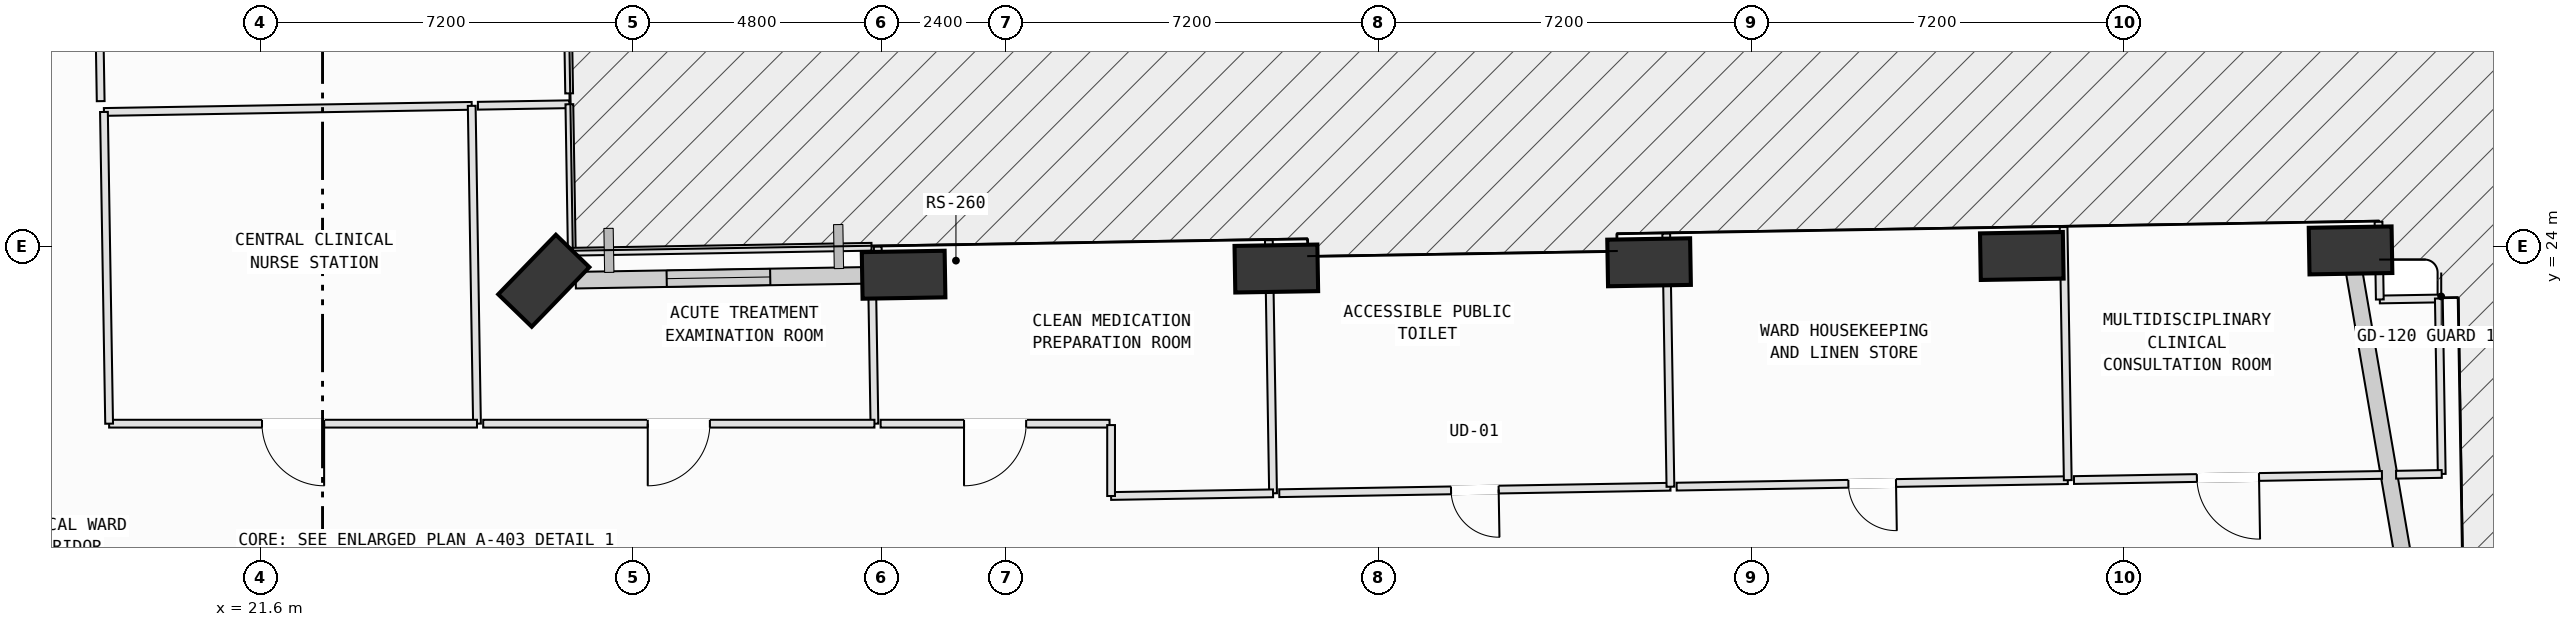
"""IFC4 building model, lengths in metres.
Left out: names, types, materials, properties, quantities, classifications, styles, units other than length and angle.
Written with IfcOpenShell. Run it as: python <this file> out.ifc"""

import sys

from ifc_helpers import new_model, si_unit, direction, frame, frame_2d, origin, origin_2d, place, context, subcontext, project, spatial, rectangle, extrude, element, fill, save


model = new_model("IFC4")
c1 = context("Model", 3, precision=1e-05, world=origin(), true_north=direction((0.0, 1.0)))
c2 = subcontext(c1, "Body", "Model", "MODEL_VIEW")
j1 = project(units=[si_unit("LENGTHUNIT", "METRE"), si_unit("PLANEANGLEUNIT", "RADIAN")], contexts=[c1])
p1 = place(None, origin())
s1 = spatial("IfcSite", under=j1, at=p1, CompositionType="ELEMENT")
p2 = place(p1, origin())
s2 = spatial("IfcBuilding", under=s1, at=p2, CompositionType="ELEMENT")
p3 = place(p2, frame((0.0, 0.0, 27.0)))
s3 = spatial("IfcBuildingStorey", under=s2, at=p3, CompositionType="ELEMENT", Elevation=27.0)
p4 = place(p3, frame((61.969, 23.927, 0.057), z_axis=(0.002645138418, 0.116755179478, 0.993157203724), x_axis=(-0.999979002339, 0.006184310224, 0.001936282211)))
e1 = element("IfcColumn", 1, at=p4, inside=s3, PredefinedType="COLUMN", context=c2, shape_type="SweptSolid", body=[
    extrude(rectangle(XDim=1.6, YDim=0.9, at=origin_2d()), origin(), (0.0, 0.0, 1.0), 3.969),
])
p5 = place(p3, frame((55.62, 23.819, 0.045), z_axis=(0.003259253209, 0.090890117801, 0.995855593826), x_axis=(-0.999812006262, 0.019330761155, 0.001507914743)))
e2 = element("IfcColumn", 2, at=p5, inside=s3, PredefinedType="COLUMN", context=c2, shape_type="SweptSolid", body=[
    extrude(rectangle(XDim=1.6, YDim=0.9, at=origin_2d()), origin(), (0.0, 0.0, 1.0), 3.97),
])
p6 = place(p3, frame((48.42, 23.698, 0.031), z_axis=(0.004053851725, 0.061360573833, 0.998107432226), x_axis=(-0.998778514599, 0.049400802185, 0.001019568036)))
e3 = element("IfcColumn", 3, at=p6, inside=s3, PredefinedType="COLUMN", context=c2, shape_type="SweptSolid", body=[
    extrude(rectangle(XDim=1.6, YDim=0.9, at=origin_2d()), origin(), (0.0, 0.0, 1.0), 3.975),
])
p7 = place(p3, frame((41.221, 23.577, 0.017), z_axis=(0.004781067333, 0.031628599282, 0.99948825561), x_axis=(-0.991107976076, 0.133059003759, 0.000530355464)))
e4 = element("IfcColumn", 4, at=p7, inside=s3, PredefinedType="COLUMN", context=c2, shape_type="SweptSolid", body=[
    extrude(rectangle(XDim=1.6, YDim=0.9, at=origin_2d()), origin(), (0.0, 0.0, 1.0), 3.983),
])
p8 = place(p3, frame((34.022, 23.457, 0.005), z_axis=(0.005502475307, 0.001834158436, 0.999983179173), x_axis=(-0.331913078241, 0.943309969864, 9.6165196e-05)))
e5 = element("IfcColumn", 5, at=p8, inside=s3, PredefinedType="COLUMN", context=c2, shape_type="SweptSolid", body=[
    extrude(rectangle(XDim=1.6, YDim=0.9, at=origin_2d()), origin(), (0.0, 0.0, 1.0), 3.993),
])
p9 = place(p3, frame((27.073, 23.341, 0.027), z_axis=(0.006268343102, -0.026978457077, 0.999616361775), x_axis=(0.514645990201, 0.857171641493, 0.019906827715)))
e6 = element("IfcColumn", 6, at=p9, inside=s3, PredefinedType="COLUMN", context=c2, shape_type="SweptSolid", body=[
    extrude(rectangle(XDim=1.6, YDim=0.9, at=origin_2d()), origin(), (0.0, 0.0, 1.0), 3.973),
])
p10 = place(p3, frame((62.032, 23.55, 0.0), z_axis=(0.0, 0.0, 1.0), x_axis=(0.169181724712, -0.985584874084, 0.0)))
e7 = element("IfcWall", 7, at=p10, inside=s3, PredefinedType="SOLIDWALL", context=c2, shape_type="SweptSolid", body=[
    extrude(rectangle(XDim=8.614, YDim=0.32, at=frame_2d((4.307, 0.0))), origin(), (0.0, 0.0, 1.0), 3.165),
])
p11 = place(p3, frame((27.69, 23.352, 0.0), z_axis=(0.0, 0.0, 1.0), x_axis=(0.999862237026, 0.016598402607, 0.0)))
e8 = element("IfcWall", 8, at=p11, inside=s3, PredefinedType="SOLIDWALL", context=c2, shape_type="SweptSolid", body=[
    extrude(rectangle(XDim=5.736, YDim=0.32, at=frame_2d((2.868, 0.0))), origin(), (0.0, 0.0, 1.0), 3.165),
])
p12 = place(p11, frame((1.757, 0.0, 0.75)))
e9 = element("IfcOpeningElement", 9, at=p12, cuts=e8, PredefinedType="OPENING", context=c2, shape_type="SweptSolid", body=[
    extrude(rectangle(XDim=2.0, YDim=1.95, at=frame_2d((1.0, 0.975))), frame((0.0, 0.17, 0.0), z_axis=(0.0, -1.0, 0.0), x_axis=(1.0, 0.0, 0.0)), (0.0, 0.0, 1.0), 0.34),
])
p13 = place(p3, frame((18.578, 26.601, 0.0), z_axis=(0.0, 0.0, 1.0), x_axis=(0.999862225883, 0.016599073868, 0.0)))
e10 = element("IfcWall", 10, at=p13, inside=s3, PredefinedType="PARTITIONING", context=c2, shape_type="SweptSolid", body=[
    extrude(rectangle(XDim=7.104, YDim=0.15, at=frame_2d((3.552, 0.0))), origin(), (0.0, 0.0, 1.0), 3.78),
])
p14 = place(p3, frame((25.681, 26.719, 0.0), z_axis=(0.0, 0.0, 1.0), x_axis=(0.016621286784, -0.999861856871, 0.0)))
e11 = element("IfcWall", 11, at=p14, inside=s3, PredefinedType="PARTITIONING", context=c2, shape_type="SweptSolid", body=[
    extrude(rectangle(XDim=6.14, YDim=0.15, at=frame_2d((3.07, 0.0))), origin(), (0.0, 0.0, 1.0), 1.365),
])
p15 = place(p3, frame((25.783, 20.58, 0.0), z_axis=(0.0, 0.0, 1.0), x_axis=(-1.0, 0.0, 0.0)))
e12 = element("IfcWall", 12, at=p15, inside=s3, PredefinedType="PARTITIONING", context=c2, shape_type="SweptSolid", body=[
    extrude(rectangle(XDim=7.105, YDim=0.15, at=frame_2d((3.552, 0.0))), origin(), (0.0, 0.0, 1.0), 3.78),
])
p16 = place(p15, frame((2.952, 0.0, 0.0)))
e13 = element("IfcOpeningElement", 13, at=p16, cuts=e12, PredefinedType="OPENING", context=c2, shape_type="SweptSolid", body=[
    extrude(rectangle(XDim=1.2, YDim=2.15, at=frame_2d((0.6, 1.075))), frame((0.0, 0.085, 0.0), z_axis=(0.0, -1.0, 0.0), x_axis=(1.0, 0.0, 0.0)), (0.0, 0.0, 1.0), 0.17),
])
p17 = place(p3, frame((18.678, 20.58, 0.0), z_axis=(0.0, 0.0, 1.0), x_axis=(-0.016622469923, 0.999861837202, 0.0)))
e14 = element("IfcWall", 14, at=p17, inside=s3, PredefinedType="PARTITIONING", context=c2, shape_type="SweptSolid", body=[
    extrude(rectangle(XDim=6.022, YDim=0.15, at=frame_2d((3.011, 0.0))), origin(), (0.0, 0.0, 1.0), 3.78),
])
p18 = place(p3, frame((25.801, 26.721, 0.0), z_axis=(0.0, 0.0, 1.0), x_axis=(0.999864687212, 0.016450144861, 0.0)))
e15 = element("IfcWall", 15, at=p18, inside=s3, PredefinedType="PARTITIONING", context=c2, shape_type="SweptSolid", body=[
    extrude(rectangle(XDim=1.766, YDim=0.15, at=frame_2d((0.883, 0.0))), origin(), (0.0, 0.0, 1.0), 3.78),
])
p19 = place(p3, frame((27.567, 26.75, 0.0), z_axis=(0.0, 0.0, 1.0), x_axis=(0.016535870755, -0.999863273142, 0.0)))
e16 = element("IfcWall", 16, at=p19, inside=s3, PredefinedType="PARTITIONING", context=c2, shape_type="SweptSolid", body=[
    extrude(rectangle(XDim=2.85, YDim=0.15, at=frame_2d((1.425, 0.0))), origin(), (0.0, 0.0, 1.0), 3.78),
])
p20 = place(p3, frame((27.614, 23.901, 0.0), z_axis=(0.0, 0.0, 1.0), x_axis=(0.999861981864, 0.016613766062, 0.0)))
e17 = element("IfcWall", 17, at=p20, inside=s3, PredefinedType="PARTITIONING", context=c2, shape_type="SweptSolid", body=[
    extrude(rectangle(XDim=5.79, YDim=0.15, at=frame_2d((2.895, 0.0))), origin(), (0.0, 0.0, 1.0), 3.78),
])
p21 = place(p3, frame((33.414, 23.312, 0.0), z_axis=(0.0, 0.0, 1.0), x_axis=(0.016441030387, -0.999864837125, 0.0)))
e18 = element("IfcWall", 18, at=p21, inside=s3, PredefinedType="PARTITIONING", context=c2, shape_type="SweptSolid", body=[
    extrude(rectangle(XDim=2.732, YDim=0.15, at=frame_2d((1.366, 0.0))), origin(), (0.0, 0.0, 1.0), 3.78),
])
p22 = place(p3, frame((33.459, 20.58, 0.0), z_axis=(0.0, 0.0, 1.0), x_axis=(-1.0, 0.0, 0.0)))
e19 = element("IfcWall", 19, at=p22, inside=s3, PredefinedType="PARTITIONING", context=c2, shape_type="SweptSolid", body=[
    extrude(rectangle(XDim=7.556, YDim=0.15, at=frame_2d((3.778, 0.0))), origin(), (0.0, 0.0, 1.0), 3.78),
])
p23 = place(p22, frame((3.178, 0.0, 0.0)))
e20 = element("IfcOpeningElement", 20, at=p23, cuts=e19, PredefinedType="OPENING", context=c2, shape_type="SweptSolid", body=[
    extrude(rectangle(XDim=1.2, YDim=2.15, at=frame_2d((0.6, 1.075))), frame((0.0, 0.085, 0.0), z_axis=(0.0, -1.0, 0.0), x_axis=(1.0, 0.0, 0.0)), (0.0, 0.0, 1.0), 0.17),
])
p24 = place(p3, frame((38.0, 20.58, 0.0), z_axis=(0.0, 0.0, 1.0), x_axis=(-1.0, 0.0, 0.0)))
e21 = element("IfcWall", 21, at=p24, inside=s3, PredefinedType="PARTITIONING", context=c2, shape_type="SweptSolid", body=[
    extrude(rectangle(XDim=4.421, YDim=0.15, at=frame_2d((2.21, 0.0))), origin(), (0.0, 0.0, 1.0), 3.365),
])
p25 = place(p24, frame((1.611, 0.0, 0.0)))
e22 = element("IfcOpeningElement", 22, at=p25, cuts=e21, PredefinedType="OPENING", context=c2, shape_type="SweptSolid", body=[
    extrude(rectangle(XDim=1.2, YDim=2.15, at=frame_2d((0.6, 1.075))), frame((0.0, 0.085, 0.0), z_axis=(0.0, -1.0, 0.0), x_axis=(1.0, 0.0, 0.0)), (0.0, 0.0, 1.0), 0.17),
])
p26 = place(p3, frame((33.531, 23.532, 0.0), z_axis=(0.0, 0.0, 1.0), x_axis=(-0.017247825975, 0.999851245186, 0.0)))
e23 = element("IfcWall", 23, at=p26, inside=s3, PredefinedType="PARTITIONING", context=c2, shape_type="SweptSolid", body=[
    extrude(rectangle(XDim=0.467, YDim=0.15, at=frame_2d((0.233, 0.0))), origin(), (0.0, 0.0, 1.0), 3.78),
])
p27 = place(p3, frame((41.077, 24.124, 0.0), z_axis=(0.0, 0.0, 1.0), x_axis=(0.016576997782, -0.999862592132, 0.0)))
e24 = element("IfcWall", 24, at=p27, inside=s3, PredefinedType="PARTITIONING", context=c2, shape_type="SweptSolid", body=[
    extrude(rectangle(XDim=4.89, YDim=0.15, at=frame_2d((2.445, 0.0))), origin(), (0.0, 0.0, 1.0), 3.78),
])
p28 = place(p3, frame((41.158, 19.235, 0.0), z_axis=(0.0, 0.0, 1.0), x_axis=(-0.999861832679, -0.016622741989, 0.0)))
e25 = element("IfcWall", 25, at=p28, inside=s3, PredefinedType="PARTITIONING", context=c2, shape_type="SweptSolid", body=[
    extrude(rectangle(XDim=3.128, YDim=0.15, at=frame_2d((1.564, 0.0))), origin(), (0.0, 0.0, 1.0), 3.78),
])
p29 = place(p3, frame((38.03, 19.183, 0.0), z_axis=(0.0, 0.0, 1.0), x_axis=(0.0, 1.0, 0.0)))
e26 = element("IfcWall", 26, at=p29, inside=s3, PredefinedType="PARTITIONING", context=c2, shape_type="SweptSolid", body=[
    extrude(rectangle(XDim=1.37, YDim=0.15, at=frame_2d((0.685, 0.0))), origin(), (0.0, 0.0, 1.0), 3.78),
])
p30 = place(p3, frame((48.833, 19.362, 0.0), z_axis=(0.0, 0.0, 1.0), x_axis=(-0.999863151577, -0.0165432197, 0.0)))
e27 = element("IfcWall", 27, at=p30, inside=s3, PredefinedType="PARTITIONING", context=c2, shape_type="SweptSolid", body=[
    extrude(rectangle(XDim=7.556, YDim=0.15, at=frame_2d((3.778, 0.0))), origin(), (0.0, 0.0, 1.0), 2.765),
])
p31 = place(p30, frame((3.318, 0.0, 0.0)))
e28 = element("IfcOpeningElement", 28, at=p31, cuts=e27, PredefinedType="OPENING", context=c2, shape_type="SweptSolid", body=[
    extrude(rectangle(XDim=0.92, YDim=2.1, at=frame_2d((0.46, 1.05))), frame((0.0, 0.085, 0.0), z_axis=(0.0, -1.0, 0.0), x_axis=(1.0, 0.0, 0.0)), (0.0, 0.0, 1.0), 0.17),
])
p32 = place(p3, frame((48.752, 24.251, 0.0), z_axis=(0.0, 0.0, 1.0), x_axis=(0.016576997782, -0.999862592132, 0.0)))
e29 = element("IfcWall", 29, at=p32, inside=s3, PredefinedType="PARTITIONING", context=c2, shape_type="SweptSolid", body=[
    extrude(rectangle(XDim=4.89, YDim=0.15, at=frame_2d((2.445, 0.0))), origin(), (0.0, 0.0, 1.0), 3.365),
])
p33 = place(p3, frame((56.507, 19.489, 0.0), z_axis=(0.0, 0.0, 1.0), x_axis=(-0.999863125045, -0.016544823218, 0.0)))
e30 = element("IfcWall", 30, at=p33, inside=s3, PredefinedType="PARTITIONING", context=c2, shape_type="SweptSolid", body=[
    extrude(rectangle(XDim=7.555, YDim=0.15, at=frame_2d((3.778, 0.0))), origin(), (0.0, 0.0, 1.0), 3.78),
])
p34 = place(p33, frame((3.317, 0.0, 0.0)))
e31 = element("IfcOpeningElement", 31, at=p34, cuts=e30, PredefinedType="OPENING", context=c2, shape_type="SweptSolid", body=[
    extrude(rectangle(XDim=0.92, YDim=2.1, at=frame_2d((0.46, 1.05))), frame((0.0, 0.085, 0.0), z_axis=(0.0, -1.0, 0.0), x_axis=(1.0, 0.0, 0.0)), (0.0, 0.0, 1.0), 0.17),
])
p35 = place(p3, frame((56.426, 24.378, 0.0), z_axis=(0.0, 0.0, 1.0), x_axis=(0.016576997782, -0.999862592132, 0.0)))
e32 = element("IfcWall", 32, at=p35, inside=s3, PredefinedType="PARTITIONING", context=c2, shape_type="SweptSolid", body=[
    extrude(rectangle(XDim=4.89, YDim=0.15, at=frame_2d((2.445, 0.0))), origin(), (0.0, 0.0, 1.0), 3.78),
])
p36 = place(p3, frame((62.534, 22.979, 0.0), z_axis=(0.0, 0.0, 1.0), x_axis=(0.999860544838, 0.016700026231, 0.0)))
e33 = element("IfcWall", 33, at=p36, inside=s3, PredefinedType="PARTITIONING", context=c2, shape_type="SweptSolid", body=[
    extrude(rectangle(XDim=1.14, YDim=0.15, at=frame_2d((0.57, 0.0))), origin(), (0.0, 0.0, 1.0), 3.78),
])
p37 = place(p3, frame((63.674, 22.998, 0.0), z_axis=(0.0, 0.0, 1.0), x_axis=(0.016493938061, -0.999863965751, 0.0)))
e34 = element("IfcWall", 34, at=p37, inside=s3, PredefinedType="PARTITIONING", context=c2, shape_type="SweptSolid", body=[
    extrude(rectangle(XDim=3.39, YDim=0.15, at=frame_2d((1.695, 0.0))), origin(), (0.0, 0.0, 1.0), 3.78),
])
p38 = place(p3, frame((63.73, 19.609, 0.0), z_axis=(0.0, 0.0, 1.0), x_axis=(-0.999857504577, -0.016881070517, 0.0)))
e35 = element("IfcWall", 35, at=p38, inside=s3, PredefinedType="PARTITIONING", context=c2, shape_type="SweptSolid", body=[
    extrude(rectangle(XDim=0.882, YDim=0.15, at=frame_2d((0.441, 0.0))), origin(), (0.0, 0.0, 1.0), 3.78),
])
p39 = place(p3, frame((62.575, 19.59, 0.0), z_axis=(0.0, 0.0, 1.0), x_axis=(-0.999861174228, -0.016662300896, 0.0)))
e36 = element("IfcWall", 36, at=p39, inside=s3, PredefinedType="PARTITIONING", context=c2, shape_type="SweptSolid", body=[
    extrude(rectangle(XDim=5.949, YDim=0.15, at=frame_2d((2.974, 0.0))), origin(), (0.0, 0.0, 1.0), 3.78),
])
p40 = place(p39, frame((2.375, 0.0, 0.0)))
e37 = element("IfcOpeningElement", 37, at=p40, cuts=e36, PredefinedType="OPENING", context=c2, shape_type="SweptSolid", body=[
    extrude(rectangle(XDim=1.2, YDim=2.15, at=frame_2d((0.6, 1.075))), frame((0.0, 0.085, 0.0), z_axis=(0.0, -1.0, 0.0), x_axis=(1.0, 0.0, 0.0)), (0.0, 0.0, 1.0), 0.17),
])
p41 = place(p3, frame((62.509, 24.479, 0.0), z_axis=(0.0, 0.0, 1.0), x_axis=(0.016599275179, -0.99986222254, 0.0)))
e38 = element("IfcWall", 38, at=p41, inside=s3, PredefinedType="PARTITIONING", context=c2, shape_type="SweptSolid", body=[
    extrude(rectangle(XDim=1.5, YDim=0.15, at=frame_2d((0.75, 0.0))), origin(), (0.0, 0.0, 1.0), 3.165),
])
p42 = place(p3, frame((18.515, 26.81, 0.0), z_axis=(0.0, 0.0, 1.0), x_axis=(-0.016600937475, 0.999862194942, 0.0)))
e39 = element("IfcWall", 39, at=p42, inside=s3, PredefinedType="PARTITIONING", context=c2, shape_type="SweptSolid", body=[
    extrude(rectangle(XDim=9.75, YDim=0.15, at=frame_2d((4.875, 0.0))), origin(), (0.0, 0.0, 1.0), 3.78),
])
p43 = place(p42, frame((4.275, 0.0, 0.0)))
e40 = element("IfcOpeningElement", 40, at=p43, cuts=e39, PredefinedType="OPENING", context=c2, shape_type="SweptSolid", body=[
    extrude(rectangle(XDim=1.2, YDim=2.15, at=frame_2d((0.6, 1.075))), frame((0.0, 0.085, 0.0), z_axis=(0.0, -1.0, 0.0), x_axis=(1.0, 0.0, 0.0)), (0.0, 0.0, 1.0), 0.17),
])
p44 = place(p3, frame((27.402, 36.709, 0.0), z_axis=(0.0, 0.0, 1.0), x_axis=(0.016500808342, -0.999863852394, 0.0)))
e41 = element("IfcWall", 41, at=p44, inside=s3, PredefinedType="PARTITIONING", context=c2, shape_type="SweptSolid", body=[
    extrude(rectangle(XDim=9.75, YDim=0.15, at=frame_2d((4.875, 0.0))), origin(), (0.0, 0.0, 1.0), 1.365),
])
p45 = place(p12, origin())
e42 = element("IfcWindow", 42, at=p45, inside=s3, PartitioningType="SINGLE_PANEL", PredefinedType="WINDOW", context=c2, shape_type="SweptSolid", body=[
    extrude(rectangle(XDim=2.0, YDim=1.95, at=frame_2d((1.0, 0.975))), frame((0.0, 0.03, 0.0), z_axis=(0.0, -1.0, 0.0), x_axis=(1.0, 0.0, 0.0)), (0.0, 0.0, 1.0), 0.06),
])
fill(e9, e42)
p46 = place(p16, origin())
e43 = element("IfcDoor", 43, at=p46, inside=s3, OperationType="SINGLE_SWING_LEFT", PredefinedType="DOOR", context=c2, shape_type="SweptSolid", body=[
    extrude(rectangle(XDim=1.2, YDim=2.15, at=frame_2d((0.6, 1.075))), frame((0.0, 0.025, 0.0), z_axis=(0.0, -1.0, 0.0), x_axis=(1.0, 0.0, 0.0)), (0.0, 0.0, 1.0), 0.05),
])
fill(e13, e43)
p47 = place(p23, origin())
e44 = element("IfcDoor", 44, at=p47, inside=s3, OperationType="SINGLE_SWING_RIGHT", PredefinedType="DOOR", context=c2, shape_type="SweptSolid", body=[
    extrude(rectangle(XDim=1.2, YDim=2.15, at=frame_2d((0.6, 1.075))), frame((0.0, 0.025, 0.0), z_axis=(0.0, -1.0, 0.0), x_axis=(1.0, 0.0, 0.0)), (0.0, 0.0, 1.0), 0.05),
])
fill(e20, e44)
p48 = place(p25, origin())
e45 = element("IfcDoor", 45, at=p48, inside=s3, OperationType="SINGLE_SWING_RIGHT", PredefinedType="DOOR", context=c2, shape_type="SweptSolid", body=[
    extrude(rectangle(XDim=1.2, YDim=2.15, at=frame_2d((0.6, 1.075))), frame((0.0, 0.025, 0.0), z_axis=(0.0, -1.0, 0.0), x_axis=(1.0, 0.0, 0.0)), (0.0, 0.0, 1.0), 0.05),
])
fill(e22, e45)
p49 = place(p31, origin())
e46 = element("IfcDoor", 46, at=p49, inside=s3, OperationType="SINGLE_SWING_LEFT", PredefinedType="DOOR", context=c2, shape_type="SweptSolid", body=[
    extrude(rectangle(XDim=0.92, YDim=2.1, at=frame_2d((0.46, 1.05))), frame((0.0, 0.025, 0.0), z_axis=(0.0, -1.0, 0.0), x_axis=(1.0, 0.0, 0.0)), (0.0, 0.0, 1.0), 0.05),
])
fill(e28, e46)
p50 = place(p34, origin())
e47 = element("IfcDoor", 47, at=p50, inside=s3, OperationType="SINGLE_SWING_LEFT", PredefinedType="DOOR", context=c2, shape_type="SweptSolid", body=[
    extrude(rectangle(XDim=0.92, YDim=2.1, at=frame_2d((0.46, 1.05))), frame((0.0, 0.025, 0.0), z_axis=(0.0, -1.0, 0.0), x_axis=(1.0, 0.0, 0.0)), (0.0, 0.0, 1.0), 0.05),
])
fill(e31, e47)
p51 = place(p40, origin())
e48 = element("IfcDoor", 48, at=p51, inside=s3, OperationType="SINGLE_SWING_LEFT", PredefinedType="DOOR", context=c2, shape_type="SweptSolid", body=[
    extrude(rectangle(XDim=1.2, YDim=2.15, at=frame_2d((0.6, 1.075))), frame((0.0, 0.025, 0.0), z_axis=(0.0, -1.0, 0.0), x_axis=(1.0, 0.0, 0.0)), (0.0, 0.0, 1.0), 0.05),
])
fill(e37, e48)
save(model, sys.argv[1])
